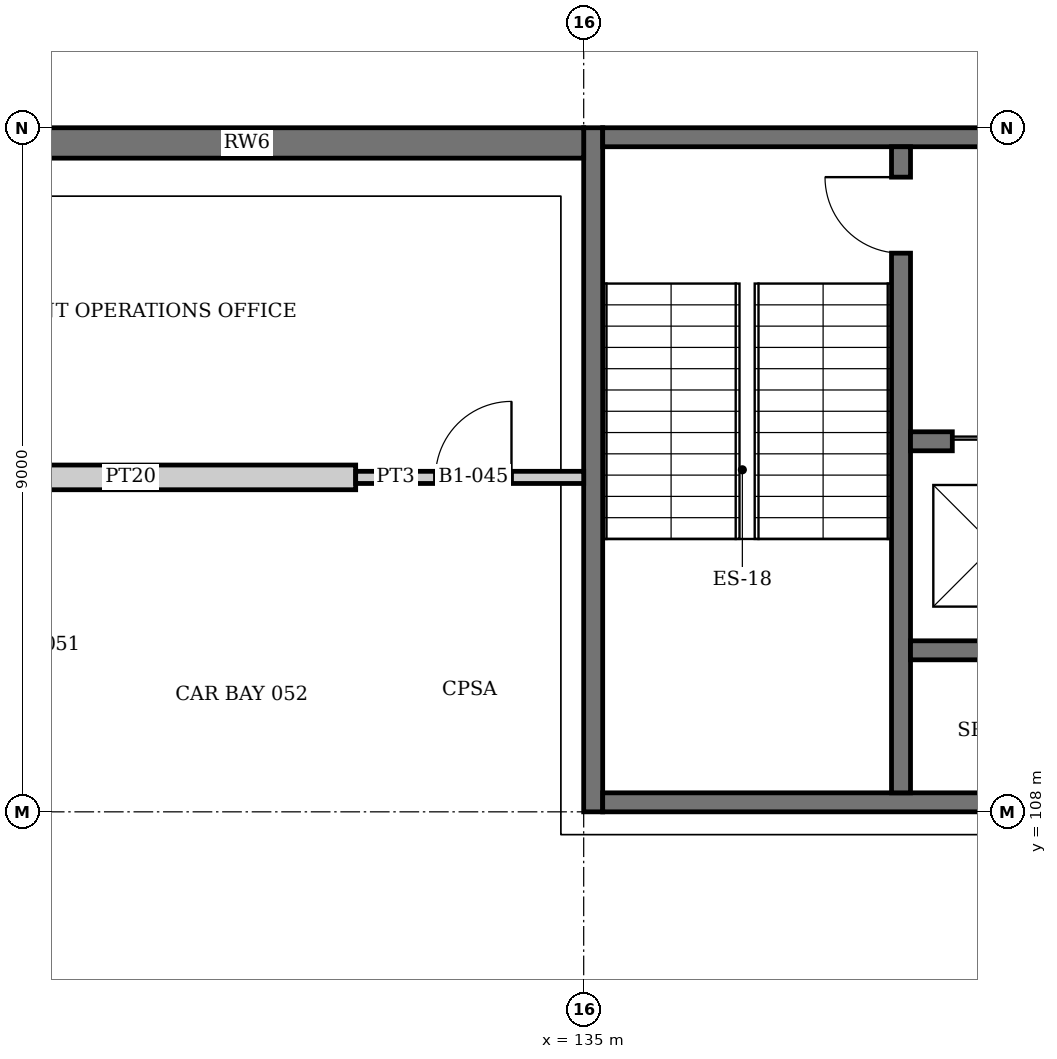
"""IFC4 building model, lengths in metres.
Left out: names, types, materials, properties, quantities, classifications, styles, units other than length and angle.
Written with IfcOpenShell. Run it as: python <this file> out.ifc"""

import sys

from ifc_helpers import new_model, si_unit, direction, frame, frame_2d, origin, place, context, subcontext, project, spatial, rectangle, extrude, element, fill, save


model = new_model("IFC4")
c1 = context("Model", 3, precision=1e-05, world=origin(), true_north=direction((0.0, 1.0)))
c2 = subcontext(c1, "Body", "Model", "MODEL_VIEW")
j1 = project(units=[si_unit("LENGTHUNIT", "METRE"), si_unit("PLANEANGLEUNIT", "RADIAN")], contexts=[c1])
p1 = place(None, origin())
s1 = spatial("IfcSite", under=j1, at=p1, CompositionType="ELEMENT")
p2 = place(p1, origin())
s2 = spatial("IfcBuilding", under=s1, at=p2, CompositionType="ELEMENT")
p3 = place(p2, frame((0.0, 0.0, -4.5)))
s3 = spatial("IfcBuildingStorey", under=s2, at=p3, CompositionType="ELEMENT", Elevation=-4.5)
p4 = place(p3, frame((135.125, 108.0, 0.0), z_axis=(0.0, 0.0, 1.0), x_axis=(0.0, 1.0, 0.0)))
e1 = element("IfcWall", 1, at=p4, inside=s3, PredefinedType="SHEAR", context=c2, shape_type="SweptSolid", body=[
    extrude(rectangle(XDim=9.0, YDim=0.25, at=frame_2d((4.5, 0.0))), origin(), (0.0, 0.0, 1.0), 4.5),
])
p5 = place(p3, frame((135.25, 108.125, 0.0), z_axis=(0.0, 0.0, 1.0), x_axis=(1.0, 0.0, 0.0)))
e2 = element("IfcWall", 2, at=p5, inside=s3, PredefinedType="SHEAR", context=c2, shape_type="SweptSolid", body=[
    extrude(rectangle(XDim=8.5, YDim=0.25, at=frame_2d((4.25, 0.0))), origin(), (0.0, 0.0, 1.0), 4.5),
])
p6 = place(p5, frame((7.175, 0.0, 0.0)))
e3 = element("IfcOpeningElement", 3, at=p6, cuts=e2, PredefinedType="OPENING", context=c2, shape_type="SweptSolid", body=[
    extrude(rectangle(XDim=1.0, YDim=2.1, at=frame_2d((0.5, 1.05))), frame((0.0, 0.135, 0.0), z_axis=(0.0, -1.0, 0.0), x_axis=(1.0, 0.0, 0.0)), (0.0, 0.0, 1.0), 0.27),
])
p7 = place(p3, frame((135.25, 116.875, 0.0), z_axis=(0.0, 0.0, 1.0), x_axis=(1.0, 0.0, 0.0)))
e4 = element("IfcWall", 4, at=p7, inside=s3, PredefinedType="SHEAR", context=c2, shape_type="SweptSolid", body=[
    extrude(rectangle(XDim=8.5, YDim=0.25, at=frame_2d((4.25, 0.0))), origin(), (0.0, 0.0, 1.0), 4.5),
])
p8 = place(p3, frame((126.138, 116.8, 0.0), z_axis=(0.0, 0.0, 1.0), x_axis=(1.0, 0.0, 0.0)))
e5 = element("IfcWall", 5, at=p8, inside=s3, PredefinedType="SOLIDWALL", context=c2, shape_type="SweptSolid", body=[
    extrude(rectangle(XDim=8.862, YDim=0.4, at=frame_2d((4.431, 0.0))), origin(), (0.0, 0.0, 1.0), 4.5),
])
p9 = place(p3, frame((139.175, 116.75, 0.0), z_axis=(0.0, 0.0, 1.0), x_axis=(0.0, -1.0, 0.0)))
e6 = element("IfcWall", 6, at=p9, inside=s3, PredefinedType="SOLIDWALL", context=c2, shape_type="SweptSolid", body=[
    extrude(rectangle(XDim=8.5, YDim=0.25, at=frame_2d((4.25, 0.0))), origin(), (0.0, 0.0, 1.0), 4.25),
])
p10 = place(p9, frame((0.4, 0.0, 0.0)))
e7 = element("IfcOpeningElement", 7, at=p10, cuts=e6, PredefinedType="OPENING", context=c2, shape_type="SweptSolid", body=[
    extrude(rectangle(XDim=1.0, YDim=2.1, at=frame_2d((0.5, 1.05))), frame((0.0, 0.135, 0.0), z_axis=(0.0, -1.0, 0.0), x_axis=(1.0, 0.0, 0.0)), (0.0, 0.0, 1.0), 0.27),
])
p11 = place(p3, frame((139.3, 110.125, 0.0), z_axis=(0.0, 0.0, 1.0), x_axis=(1.0, 0.0, 0.0)))
e8 = element("IfcWall", 8, at=p11, inside=s3, PredefinedType="SOLIDWALL", context=c2, shape_type="SweptSolid", body=[
    extrude(rectangle(XDim=2.45, YDim=0.25, at=frame_2d((1.225, 0.0))), origin(), (0.0, 0.0, 1.0), 4.5),
])
p12 = place(p3, frame((139.3, 112.875, 0.0), z_axis=(0.0, 0.0, 1.0), x_axis=(1.0, 0.0, 0.0)))
e9 = element("IfcWall", 9, at=p12, inside=s3, PredefinedType="SOLIDWALL", context=c2, shape_type="SweptSolid", body=[
    extrude(rectangle(XDim=2.45, YDim=0.25, at=frame_2d((1.225, 0.0))), origin(), (0.0, 0.0, 1.0), 4.5),
])
p13 = place(p12, frame((0.55, 0.0, 0.0)))
e10 = element("IfcOpeningElement", 10, at=p13, cuts=e9, PredefinedType="OPENING", context=c2, shape_type="SweptSolid", body=[
    extrude(rectangle(XDim=1.1, YDim=2.1, at=frame_2d((0.55, 1.05))), frame((0.0, 0.135, 0.0), z_axis=(0.0, -1.0, 0.0), x_axis=(1.0, 0.0, 0.0)), (0.0, 0.0, 1.0), 0.27),
])
p14 = place(p3, frame((126.08, 112.4, 0.0), z_axis=(0.0, 0.0, 1.0), x_axis=(1.0, 0.0, 0.0)))
e11 = element("IfcWall", 11, at=p14, inside=s3, PredefinedType="PARTITIONING", context=c2, shape_type="SweptSolid", body=[
    extrude(rectangle(XDim=5.92, YDim=0.325, at=frame_2d((2.96, 0.0))), origin(), (0.0, 0.0, 1.0), 3.79),
])
p15 = place(p3, frame((132.0, 112.4, 0.0), z_axis=(0.0, 0.0, 1.0), x_axis=(1.0, 0.0, 0.0)))
e12 = element("IfcWall", 12, at=p15, inside=s3, PredefinedType="PARTITIONING", context=c2, shape_type="SweptSolid", body=[
    extrude(rectangle(XDim=3.0, YDim=0.16, at=frame_2d((1.5, 0.0))), origin(), (0.0, 0.0, 1.0), 4.25),
])
p16 = place(p15, frame((1.05, 0.0, 0.0)))
e13 = element("IfcOpeningElement", 13, at=p16, cuts=e12, PredefinedType="OPENING", context=c2, shape_type="SweptSolid", body=[
    extrude(rectangle(XDim=1.0, YDim=2.1, at=frame_2d((0.5, 1.05))), frame((0.0, 0.09, 0.0), z_axis=(0.0, -1.0, 0.0), x_axis=(1.0, 0.0, 0.0)), (0.0, 0.0, 1.0), 0.18),
])
p17 = place(p13, origin())
e14 = element("IfcDoor", 14, at=p17, inside=s3, OperationType="DOUBLE_DOOR_SLIDING", PredefinedType="DOOR", context=c2, shape_type="SweptSolid", body=[
    extrude(rectangle(XDim=1.1, YDim=2.1, at=frame_2d((0.55, 1.05))), frame((0.0, 0.025, 0.0), z_axis=(0.0, -1.0, 0.0), x_axis=(1.0, 0.0, 0.0)), (0.0, 0.0, 1.0), 0.05),
])
fill(e10, e14)
p18 = place(p10, frame((1.0, 0.0, 0.0), z_axis=(0.0, 0.0, 1.0), x_axis=(-1.0, 0.0, 0.0)))
e15 = element("IfcDoor", 15, at=p18, inside=s3, OperationType="SINGLE_SWING_RIGHT", PredefinedType="DOOR", context=c2, shape_type="SweptSolid", body=[
    extrude(rectangle(XDim=1.0, YDim=2.1, at=frame_2d((0.5, 1.05))), frame((0.0, 0.025, 0.0), z_axis=(0.0, -1.0, 0.0), x_axis=(1.0, 0.0, 0.0)), (0.0, 0.0, 1.0), 0.05),
])
fill(e7, e15)
p19 = place(p16, origin())
e16 = element("IfcDoor", 16, at=p19, inside=s3, OperationType="SINGLE_SWING_RIGHT", PredefinedType="DOOR", context=c2, shape_type="SweptSolid", body=[
    extrude(rectangle(XDim=1.0, YDim=2.1, at=frame_2d((0.5, 1.05))), frame((0.0, 0.025, 0.0), z_axis=(0.0, -1.0, 0.0), x_axis=(1.0, 0.0, 0.0)), (0.0, 0.0, 1.0), 0.05),
])
fill(e13, e16)
save(model, sys.argv[1])
